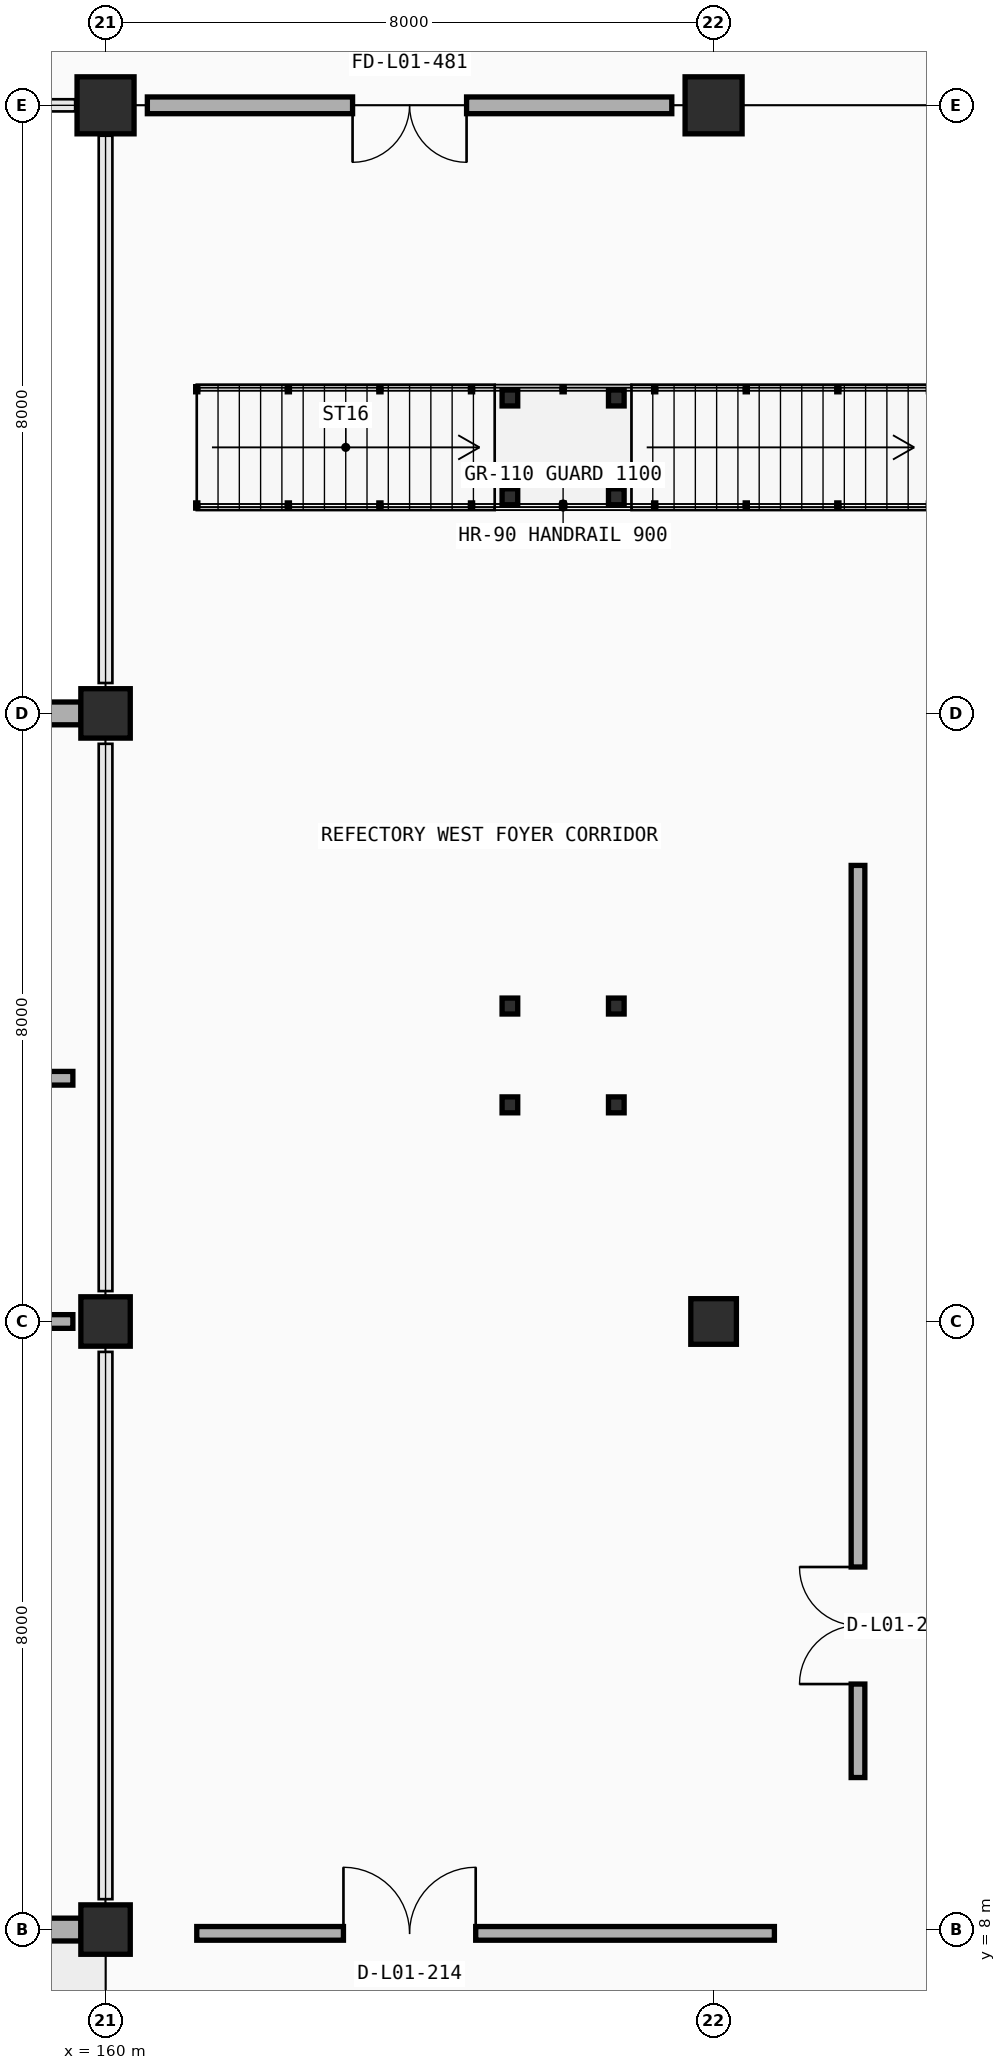
"""IFC4 building model, lengths in metres.
Left out: names, types, materials, properties, quantities, classifications, styles, units other than length and angle.
Written with IfcOpenShell. Run it as: python <this file> out.ifc"""

import sys

from ifc_helpers import new_model, si_unit, direction, frame, frame_2d, origin, origin_2d, place, context, subcontext, project, spatial, rectangle, i_section, extrude, element, fill, save


model = new_model("IFC4")
c1 = context("Model", 3, precision=1e-05, world=origin(), true_north=direction((0.0, 1.0)))
c2 = subcontext(c1, "Body", "Model", "MODEL_VIEW")
j1 = project(units=[si_unit("LENGTHUNIT", "METRE"), si_unit("PLANEANGLEUNIT", "RADIAN")], contexts=[c1])
p1 = place(None, origin())
s1 = spatial("IfcSite", under=j1, at=p1, CompositionType="ELEMENT")
p2 = place(p1, origin())
s2 = spatial("IfcBuilding", under=s1, at=p2, CompositionType="ELEMENT")
p3 = place(p2, origin())
s3 = spatial("IfcBuildingStorey", under=s2, at=p3, CompositionType="ELEMENT", Elevation=0.0)
for number, where, z_axis, x_axis in (
    (1, (160.0, 8.0, 0.0), (0.0, 0.0, 1.0), (1.0, 0.0, 0.0)),
    (2, (160.0, 16.0, 0.0), (0.0, 0.0, 1.0), (1.0, 0.0, 0.0)),
):
    element("IfcColumn", number, at=place(p3, frame(where, z_axis=z_axis, x_axis=x_axis)), inside=s3, PredefinedType="COLUMN", context=c2, shape_type="SweptSolid", body=[
        extrude(rectangle(XDim=0.65, YDim=0.65, at=origin_2d()), origin(), (0.0, 0.0, 1.0), 4.8),
    ])
p4 = place(p3, frame((168.0, 16.0, 0.0), z_axis=(0.0, 0.0, 1.0), x_axis=(1.0, 0.0, 0.0)))
e3 = element("IfcColumn", 3, at=p4, inside=s3, PredefinedType="COLUMN", context=c2, shape_type="SweptSolid", body=[
    extrude(rectangle(XDim=0.6, YDim=0.6, at=origin_2d()), origin(), (0.0, 0.0, 1.0), 4.8),
])
p5 = place(p3, frame((160.0, 24.0, 0.0), z_axis=(0.0, 0.0, 1.0), x_axis=(1.0, 0.0, 0.0)))
e4 = element("IfcColumn", 4, at=p5, inside=s3, PredefinedType="COLUMN", context=c2, shape_type="SweptSolid", body=[
    extrude(rectangle(XDim=0.65, YDim=0.65, at=origin_2d()), origin(), (0.0, 0.0, 1.0), 4.8),
])
for number, where, z_axis, x_axis in (
    (5, (160.0, 32.0, 0.0), (0.0, 0.0, 1.0), (1.0, 0.0, 0.0)),
    (6, (168.0, 32.0, 0.0), (0.0, 0.0, 1.0), (1.0, 0.0, 0.0)),
):
    element("IfcColumn", number, at=place(p3, frame(where, z_axis=z_axis, x_axis=x_axis)), inside=s3, PredefinedType="COLUMN", context=c2, shape_type="SweptSolid", body=[
        extrude(rectangle(XDim=0.75, YDim=0.75, at=origin_2d()), origin(), (0.0, 0.0, 1.0), 4.8),
    ])
for number, where, z_axis, x_axis in (
    (7, (165.32, 26.85, 0.0), (0.0, 0.0, 1.0), (1.0, 0.0, 0.0)),
    (8, (165.32, 28.15, 0.0), (0.0, 0.0, 1.0), (1.0, 0.0, 0.0)),
    (9, (166.72, 26.85, 0.0), (0.0, 0.0, 1.0), (1.0, 0.0, 0.0)),
    (10, (166.72, 28.15, 0.0), (0.0, 0.0, 1.0), (1.0, 0.0, 0.0)),
):
    element("IfcColumn", number, at=place(p3, frame(where, z_axis=z_axis, x_axis=x_axis)), inside=s3, PredefinedType="COLUMN", context=c2, shape_type="SweptSolid", body=[
        extrude(i_section(OverallWidth=0.206, OverallDepth=0.21, WebThickness=0.01, FlangeThickness=0.014, FilletRadius=0.01, at=origin_2d()), origin(), (0.0, 0.0, 1.0), 2.2),
    ])
for number, where, z_axis, x_axis in (
    (11, (165.32, 18.85, 0.0), (0.0, 0.0, 1.0), (1.0, 0.0, 0.0)),
    (12, (165.32, 20.15, 0.0), (0.0, 0.0, 1.0), (1.0, 0.0, 0.0)),
    (13, (166.72, 18.85, 0.0), (0.0, 0.0, 1.0), (1.0, 0.0, 0.0)),
    (14, (166.72, 20.15, 0.0), (0.0, 0.0, 1.0), (1.0, 0.0, 0.0)),
):
    element("IfcColumn", number, at=place(p3, frame(where, z_axis=z_axis, x_axis=x_axis)), inside=s3, PredefinedType="COLUMN", context=c2, shape_type="SweptSolid", body=[
        extrude(i_section(OverallWidth=0.206, OverallDepth=0.21, WebThickness=0.01, FlangeThickness=0.014, FilletRadius=0.01, at=origin_2d()), origin(), (0.0, 0.0, 1.0), 4.52),
    ])
p6 = place(p3, frame((159.678, 8.0, 0.0), z_axis=(0.0, 0.0, 1.0), x_axis=(-1.0, 0.0, 0.0)))
e15 = element("IfcWall", 15, at=p6, inside=s3, PredefinedType="STANDARD", context=c2, shape_type="SweptSolid", body=[
    extrude(rectangle(XDim=7.331, YDim=0.3, at=frame_2d((3.666, 0.0))), origin(), (0.0, 0.0, 1.0), 3.91),
])
p7 = place(p6, frame((2.258, 0.0, 0.9)))
e16 = element("IfcOpeningElement", 16, at=p7, cuts=e15, PredefinedType="OPENING", context=c2, shape_type="SweptSolid", body=[
    extrude(rectangle(XDim=1.45, YDim=1.25, at=frame_2d((0.725, 0.625))), frame((0.0, 0.16, 0.0), z_axis=(0.0, -1.0, 0.0), x_axis=(1.0, 0.0, 0.0)), (0.0, 0.0, 1.0), 0.32),
])
p8 = place(p3, frame((152.347, 24.0, 0.0), z_axis=(0.0, 0.0, 1.0), x_axis=(1.0, 0.0, 0.0)))
e17 = element("IfcWall", 17, at=p8, inside=s3, PredefinedType="STANDARD", context=c2, shape_type="SweptSolid", body=[
    extrude(rectangle(XDim=7.331, YDim=0.3, at=frame_2d((3.666, 0.0))), origin(), (0.0, 0.0, 1.0), 3.91),
])
p9 = place(p8, frame((2.233, 0.0, 0.9)))
e18 = element("IfcOpeningElement", 18, at=p9, cuts=e17, PredefinedType="OPENING", context=c2, shape_type="SweptSolid", body=[
    extrude(rectangle(XDim=1.65, YDim=1.25, at=frame_2d((0.825, 0.625))), frame((0.0, 0.16, 0.0), z_axis=(0.0, -1.0, 0.0), x_axis=(1.0, 0.0, 0.0)), (0.0, 0.0, 1.0), 0.32),
])
p10 = place(p3, frame((144.43, 16.0, 0.0), z_axis=(0.0, 0.0, 1.0), x_axis=(1.0, 0.0, 0.0)))
e19 = element("IfcWall", 19, at=p10, inside=s3, PredefinedType="PARTITIONING", context=c2, shape_type="SweptSolid", body=[
    extrude(rectangle(XDim=15.14, YDim=0.18, at=frame_2d((7.57, 0.0))), origin(), (0.0, 0.0, 1.0), 3.81),
])
p11 = place(p10, frame((3.07, 0.0, 0.0)))
e20 = element("IfcOpeningElement", 20, at=p11, cuts=e19, PredefinedType="OPENING", context=c2, shape_type="SweptSolid", body=[
    extrude(rectangle(XDim=1.0, YDim=2.15, at=frame_2d((0.5, 1.075))), frame((0.0, 0.1, 0.0), z_axis=(0.0, -1.0, 0.0), x_axis=(1.0, 0.0, 0.0)), (0.0, 0.0, 1.0), 0.2),
])
p12 = place(p3, frame((136.43, 19.2, 0.0), z_axis=(0.0, 0.0, 1.0), x_axis=(1.0, 0.0, 0.0)))
e21 = element("IfcWall", 21, at=p12, inside=s3, PredefinedType="PARTITIONING", context=c2, shape_type="SweptSolid", body=[
    extrude(rectangle(XDim=23.14, YDim=0.18, at=frame_2d((11.57, 0.0))), origin(), (0.0, 0.0, 1.0), 3.9),
])
p13 = place(p12, frame((2.79, 0.0, 0.0)))
e22 = element("IfcOpeningElement", 22, at=p13, cuts=e21, PredefinedType="OPENING", context=c2, shape_type="SweptSolid", body=[
    extrude(rectangle(XDim=1.56, YDim=2.2, at=frame_2d((0.78, 1.1))), frame((0.0, 0.1, 0.0), z_axis=(0.0, -1.0, 0.0), x_axis=(1.0, 0.0, 0.0)), (0.0, 0.0, 1.0), 0.2),
])
p14 = place(p3, frame((169.9, 10.0, 0.0), z_axis=(0.0, 0.0, 1.0), x_axis=(0.0, 1.0, 0.0)))
e23 = element("IfcWall", 23, at=p14, inside=s3, PredefinedType="PARTITIONING", context=c2, shape_type="SweptSolid", body=[
    extrude(rectangle(XDim=12.0, YDim=0.18, at=frame_2d((6.0, 0.0))), origin(), (0.0, 0.0, 1.0), 3.9),
])
p15 = place(p14, frame((1.23, 0.0, 0.0)))
e24 = element("IfcOpeningElement", 24, at=p15, cuts=e23, PredefinedType="OPENING", context=c2, shape_type="SweptSolid", body=[
    extrude(rectangle(XDim=1.54, YDim=2.2, at=frame_2d((0.77, 1.1))), frame((0.0, 0.1, 0.0), z_axis=(0.0, -1.0, 0.0), x_axis=(1.0, 0.0, 0.0)), (0.0, 0.0, 1.0), 0.2),
])
p16 = place(p3, frame((161.2, 7.95, 0.0), z_axis=(0.0, 0.0, 1.0), x_axis=(1.0, 0.0, 0.0)))
e25 = element("IfcWall", 25, at=p16, inside=s3, PredefinedType="PARTITIONING", context=c2, shape_type="SweptSolid", body=[
    extrude(rectangle(XDim=7.6, YDim=0.18, at=frame_2d((3.8, 0.0))), origin(), (0.0, 0.0, 1.0), 3.9),
])
p17 = place(p16, frame((1.93, 0.0, 0.0)))
e26 = element("IfcOpeningElement", 26, at=p17, cuts=e25, PredefinedType="OPENING", context=c2, shape_type="SweptSolid", body=[
    extrude(rectangle(XDim=1.74, YDim=2.22, at=frame_2d((0.87, 1.11))), frame((0.0, 0.1, 0.0), z_axis=(0.0, -1.0, 0.0), x_axis=(1.0, 0.0, 0.0)), (0.0, 0.0, 1.0), 0.2),
])
p18 = place(p3, frame((167.45, 32.0, 0.0), z_axis=(0.0, 0.0, 1.0), x_axis=(-1.0, 0.0, 0.0)))
e27 = element("IfcWall", 27, at=p18, inside=s3, PredefinedType="PARTITIONING", context=c2, shape_type="SweptSolid", body=[
    extrude(rectangle(XDim=6.9, YDim=0.22, at=frame_2d((3.45, 0.0))), origin(), (0.0, 0.0, 1.0), 3.89),
])
p19 = place(p18, frame((2.7, 0.0, 0.0)))
e28 = element("IfcOpeningElement", 28, at=p19, cuts=e27, PredefinedType="OPENING", context=c2, shape_type="SweptSolid", body=[
    extrude(rectangle(XDim=1.5, YDim=2.2, at=frame_2d((0.75, 1.1))), frame((0.0, 0.12, 0.0), z_axis=(0.0, -1.0, 0.0), x_axis=(1.0, 0.0, 0.0)), (0.0, 0.0, 1.0), 0.24),
])
p20 = place(p15, origin())
e29 = element("IfcDoor", 29, at=p20, inside=s3, OperationType="DOUBLE_DOOR_SINGLE_SWING", PredefinedType="DOOR", context=c2, shape_type="SweptSolid", body=[
    extrude(rectangle(XDim=1.54, YDim=2.2, at=frame_2d((0.77, 1.1))), frame((0.0, 0.025, 0.0), z_axis=(0.0, -1.0, 0.0), x_axis=(1.0, 0.0, 0.0)), (0.0, 0.0, 1.0), 0.05),
])
fill(e24, e29)
p21 = place(p17, origin())
e30 = element("IfcDoor", 30, at=p21, inside=s3, OperationType="DOUBLE_DOOR_SINGLE_SWING", PredefinedType="DOOR", context=c2, shape_type="SweptSolid", body=[
    extrude(rectangle(XDim=1.74, YDim=2.22, at=frame_2d((0.87, 1.11))), frame((0.0, 0.025, 0.0), z_axis=(0.0, -1.0, 0.0), x_axis=(1.0, 0.0, 0.0)), (0.0, 0.0, 1.0), 0.05),
])
fill(e26, e30)
p22 = place(p19, origin())
e31 = element("IfcDoor", 31, at=p22, inside=s3, OperationType="DOUBLE_DOOR_SINGLE_SWING", PredefinedType="DOOR", context=c2, shape_type="SweptSolid", body=[
    extrude(rectangle(XDim=1.5, YDim=2.2, at=frame_2d((0.75, 1.1))), frame((0.0, 0.025, 0.0), z_axis=(0.0, -1.0, 0.0), x_axis=(1.0, 0.0, 0.0)), (0.0, 0.0, 1.0), 0.05),
])
fill(e28, e31)
save(model, sys.argv[1])
